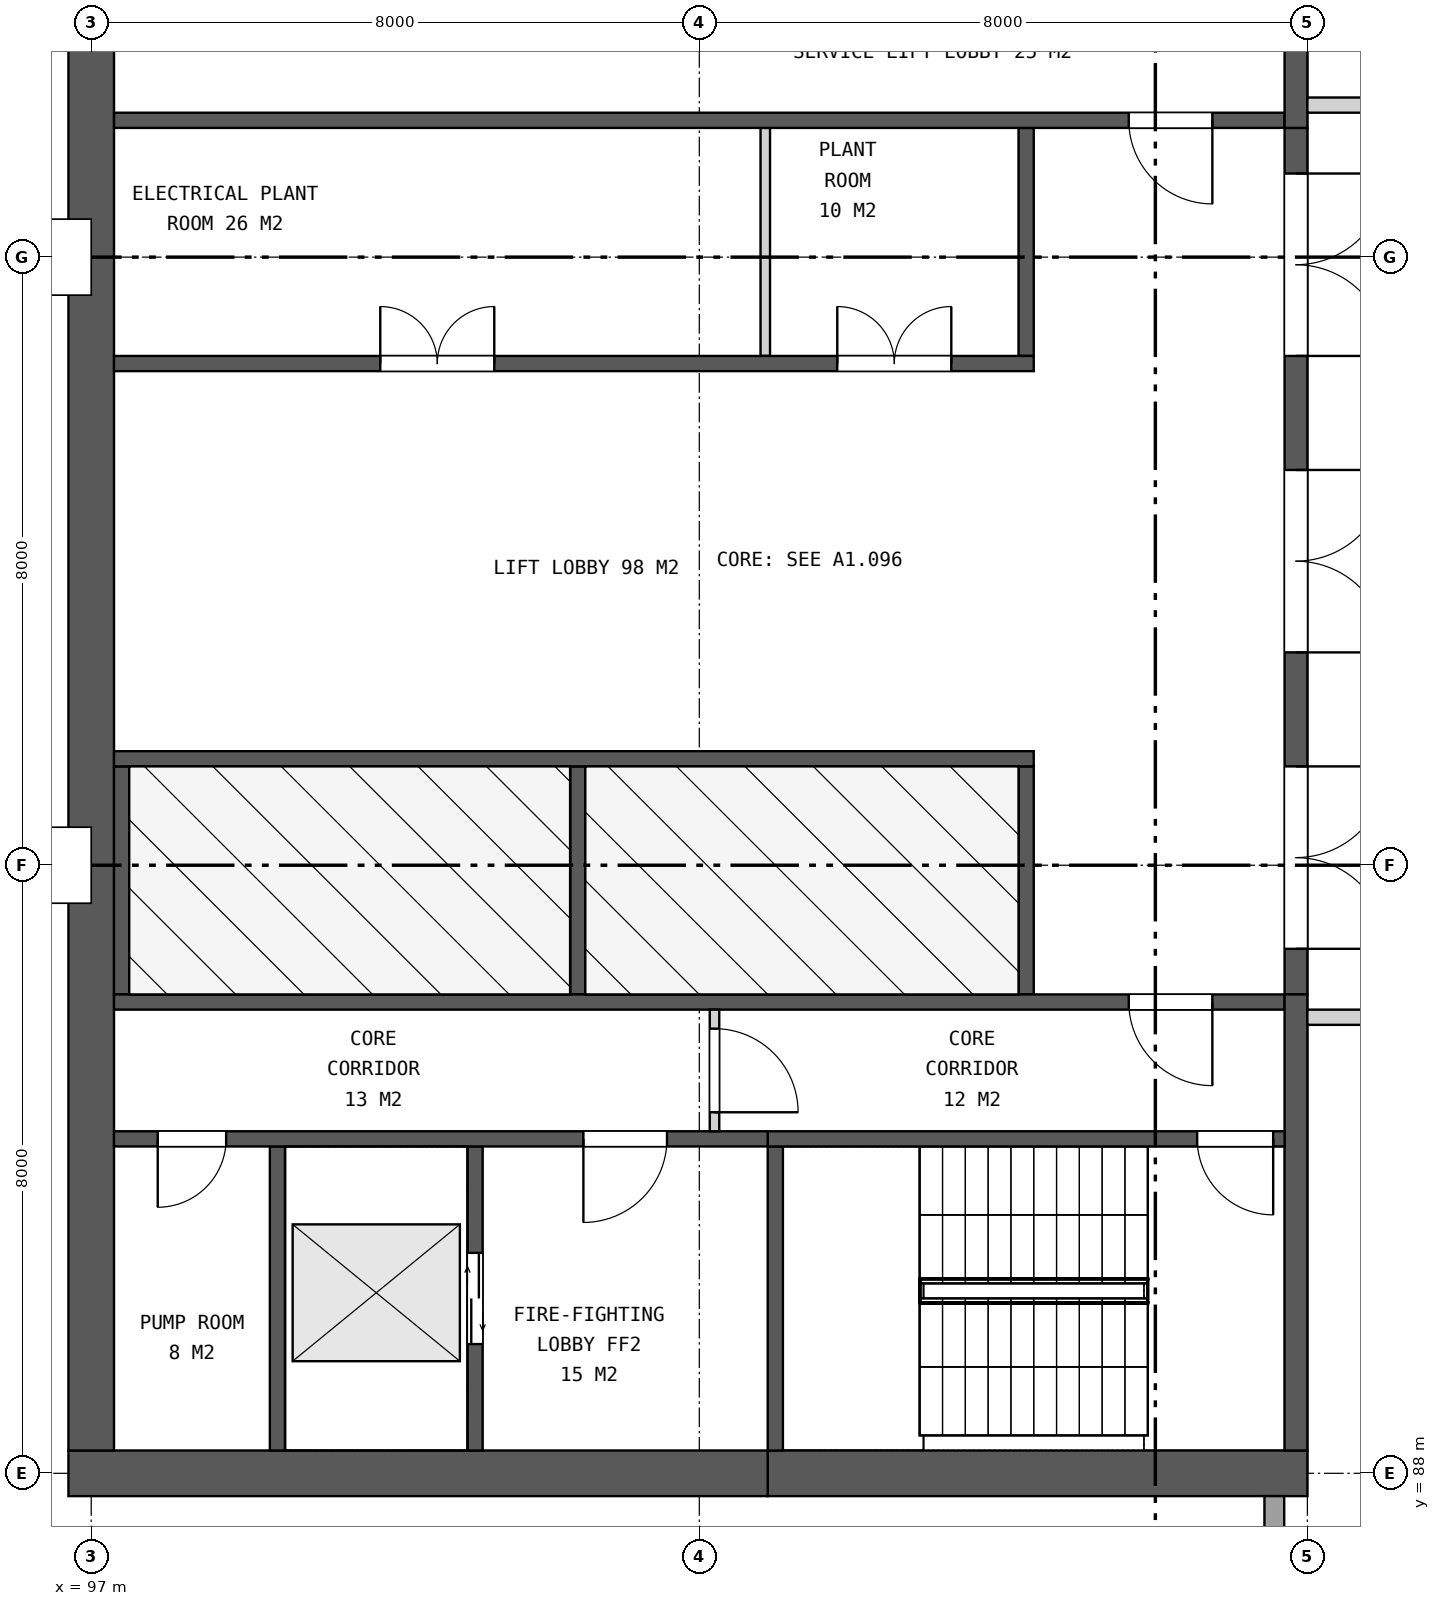
"""IFC4 building model, lengths in metres.
Left out: names, types, materials, properties, quantities, classifications, styles, units other than length and angle.
Written with IfcOpenShell. Run it as: python <this file> out.ifc"""

import sys

from ifc_helpers import new_model, si_unit, direction, frame, frame_2d, origin, place, context, subcontext, project, spatial, rectangle, extrude, element, fill, save


model = new_model("IFC4")
c1 = context("Model", 3, precision=1e-05, world=origin(), true_north=direction((0.0, 1.0)))
c2 = subcontext(c1, "Body", "Model", "MODEL_VIEW")
j1 = project(units=[si_unit("LENGTHUNIT", "METRE"), si_unit("PLANEANGLEUNIT", "RADIAN")], contexts=[c1])
p1 = place(None, origin())
s1 = spatial("IfcSite", under=j1, at=p1, CompositionType="ELEMENT")
p2 = place(p1, origin())
s2 = spatial("IfcBuilding", under=s1, at=p2, CompositionType="ELEMENT")
p3 = place(p2, frame((0.0, 0.0, 237.7)))
s3 = spatial("IfcBuildingStorey", under=s2, at=p3, CompositionType="ELEMENT", Elevation=237.7)
p4 = place(p3, frame((113.0, 88.0, 0.0), z_axis=(0.0, 0.0, 1.0), x_axis=(-1.0, 0.0, 0.0)))
e1 = element("IfcWall", 1, at=p4, inside=s3, PredefinedType="SHEAR", context=c2, shape_type="SweptSolid", body=[
    extrude(rectangle(XDim=7.1, YDim=0.6, at=frame_2d((3.55, 0.0))), origin(), (0.0, 0.0, 1.0), 7.4),
])
p5 = place(p3, frame((105.9, 88.0, 0.0), z_axis=(0.0, 0.0, 1.0), x_axis=(-1.0, 0.0, 0.0)))
e2 = element("IfcWall", 2, at=p5, inside=s3, PredefinedType="SHEAR", context=c2, shape_type="SweptSolid", body=[
    extrude(rectangle(XDim=9.2, YDim=0.6, at=frame_2d((4.6, 0.0))), origin(), (0.0, 0.0, 1.0), 7.4),
])
p6 = place(p3, frame((97.0, 111.7, 0.0), z_axis=(0.0, 0.0, 1.0), x_axis=(0.0, -1.0, 0.0)))
e3 = element("IfcWall", 3, at=p6, inside=s3, PredefinedType="SHEAR", context=c2, shape_type="SweptSolid", body=[
    extrude(rectangle(XDim=23.4, YDim=0.6, at=frame_2d((11.7, 0.0))), origin(), (0.0, 0.0, 1.0), 7.4),
])
p7 = place(p3, frame((112.85, 105.7, 0.0), z_axis=(0.0, 0.0, 1.0), x_axis=(0.0, -1.0, 0.0)))
e4 = element("IfcWall", 4, at=p7, inside=s3, PredefinedType="SHEAR", context=c2, shape_type="SweptSolid", body=[
    extrude(rectangle(XDim=11.4, YDim=0.3, at=frame_2d((5.7, 0.0))), origin(), (0.0, 0.0, 1.0), 7.4),
])
p8 = place(p7, frame((0.6, 0.0, 0.0)))
e5 = element("IfcOpeningElement", 5, at=p8, cuts=e4, PredefinedType="OPENING", context=c2, shape_type="SweptSolid", body=[
    extrude(rectangle(XDim=2.4, YDim=2.4, at=frame_2d((1.2, 1.2))), frame((0.0, 0.16, 0.0), z_axis=(0.0, -1.0, 0.0), x_axis=(1.0, 0.0, 0.0)), (0.0, 0.0, 1.0), 0.32),
])
p9 = place(p7, frame((4.5, 0.0, 0.0)))
e6 = element("IfcOpeningElement", 6, at=p9, cuts=e4, PredefinedType="OPENING", context=c2, shape_type="SweptSolid", body=[
    extrude(rectangle(XDim=2.4, YDim=2.4, at=frame_2d((1.2, 1.2))), frame((0.0, 0.16, 0.0), z_axis=(0.0, -1.0, 0.0), x_axis=(1.0, 0.0, 0.0)), (0.0, 0.0, 1.0), 0.32),
])
p10 = place(p7, frame((8.4, 0.0, 0.0)))
e7 = element("IfcOpeningElement", 7, at=p10, cuts=e4, PredefinedType="OPENING", context=c2, shape_type="SweptSolid", body=[
    extrude(rectangle(XDim=2.4, YDim=2.4, at=frame_2d((1.2, 1.2))), frame((0.0, 0.16, 0.0), z_axis=(0.0, -1.0, 0.0), x_axis=(1.0, 0.0, 0.0)), (0.0, 0.0, 1.0), 0.32),
])
for number, where, z_axis, x_axis in (
    (8, (109.3, 97.3, 0.0), (0.0, 0.0, 1.0), (0.0, -1.0, 0.0)),
    (9, (103.4, 97.3, 0.0), (0.0, 0.0, 1.0), (0.0, -1.0, 0.0)),
    (10, (97.4, 97.3, 0.0), (0.0, 0.0, 1.0), (0.0, -1.0, 0.0)),
):
    element("IfcWall", number, at=place(p3, frame(where, z_axis=z_axis, x_axis=x_axis)), inside=s3, PredefinedType="SHEAR", context=c2, shape_type="SweptSolid", body=[
        extrude(rectangle(XDim=3.0, YDim=0.2, at=frame_2d((1.5, 0.0))), origin(), (0.0, 0.0, 1.0), 7.4),
    ])
p11 = place(p3, frame((109.4, 97.4, 0.0), z_axis=(0.0, 0.0, 1.0), x_axis=(-1.0, 0.0, 0.0)))
e11 = element("IfcWall", 11, at=p11, inside=s3, PredefinedType="SHEAR", context=c2, shape_type="SweptSolid", body=[
    extrude(rectangle(XDim=12.1, YDim=0.2, at=frame_2d((6.05, 0.0))), origin(), (0.0, 0.0, 1.0), 7.4),
])
p12 = place(p3, frame((109.3, 105.7, 0.0), z_axis=(0.0, 0.0, 1.0), x_axis=(0.0, -1.0, 0.0)))
e12 = element("IfcWall", 12, at=p12, inside=s3, PredefinedType="SHEAR", context=c2, shape_type="SweptSolid", body=[
    extrude(rectangle(XDim=3.0, YDim=0.2, at=frame_2d((1.5, 0.0))), origin(), (0.0, 0.0, 1.0), 7.4),
])
p13 = place(p3, frame((105.868, 105.7, 0.0), z_axis=(0.0, 0.0, 1.0), x_axis=(0.0, -1.0, 0.0)))
e13 = element("IfcWall", 13, at=p13, inside=s3, PredefinedType="PARTITIONING", context=c2, shape_type="SweptSolid", body=[
    extrude(rectangle(XDim=3.0, YDim=0.125, at=frame_2d((1.5, 0.0))), origin(), (0.0, 0.0, 1.0), 7.4),
])
p14 = place(p3, frame((109.4, 102.6, 0.0), z_axis=(0.0, 0.0, 1.0), x_axis=(-1.0, 0.0, 0.0)))
e14 = element("IfcWall", 14, at=p14, inside=s3, PredefinedType="SHEAR", context=c2, shape_type="SweptSolid", body=[
    extrude(rectangle(XDim=12.1, YDim=0.2, at=frame_2d((6.05, 0.0))), origin(), (0.0, 0.0, 1.0), 7.4),
])
p15 = place(p14, frame((1.085, 0.0, 0.0)))
e15 = element("IfcOpeningElement", 15, at=p15, cuts=e14, PredefinedType="OPENING", context=c2, shape_type="SweptSolid", body=[
    extrude(rectangle(XDim=1.5, YDim=2.1, at=frame_2d((0.75, 1.05))), frame((0.0, 0.11, 0.0), z_axis=(0.0, -1.0, 0.0), x_axis=(1.0, 0.0, 0.0)), (0.0, 0.0, 1.0), 0.22),
])
p16 = place(p14, frame((7.097, 0.0, 0.0)))
e16 = element("IfcOpeningElement", 16, at=p16, cuts=e14, PredefinedType="OPENING", context=c2, shape_type="SweptSolid", body=[
    extrude(rectangle(XDim=1.5, YDim=2.1, at=frame_2d((0.75, 1.05))), frame((0.0, 0.11, 0.0), z_axis=(0.0, -1.0, 0.0), x_axis=(1.0, 0.0, 0.0)), (0.0, 0.0, 1.0), 0.22),
])
p17 = place(p3, frame((112.7, 94.2, 0.0), z_axis=(0.0, 0.0, 1.0), x_axis=(-1.0, 0.0, 0.0)))
e17 = element("IfcWall", 17, at=p17, inside=s3, PredefinedType="SHEAR", context=c2, shape_type="SweptSolid", body=[
    extrude(rectangle(XDim=15.4, YDim=0.2, at=frame_2d((7.7, 0.0))), origin(), (0.0, 0.0, 1.0), 7.4),
])
p18 = place(p17, frame((0.95, 0.0, 0.0)))
e18 = element("IfcOpeningElement", 18, at=p18, cuts=e17, PredefinedType="OPENING", context=c2, shape_type="SweptSolid", body=[
    extrude(rectangle(XDim=1.1, YDim=2.1, at=frame_2d((0.55, 1.05))), frame((0.0, 0.11, 0.0), z_axis=(0.0, -1.0, 0.0), x_axis=(1.0, 0.0, 0.0)), (0.0, 0.0, 1.0), 0.22),
])
p19 = place(p3, frame((112.85, 94.3, 0.0), z_axis=(0.0, 0.0, 1.0), x_axis=(0.0, -1.0, 0.0)))
e19 = element("IfcWall", 19, at=p19, inside=s3, PredefinedType="SHEAR", context=c2, shape_type="SweptSolid", body=[
    extrude(rectangle(XDim=6.0, YDim=0.3, at=frame_2d((3.0, 0.0))), origin(), (0.0, 0.0, 1.0), 7.4),
])
p20 = place(p3, frame((106.0, 92.3, 0.0), z_axis=(0.0, 0.0, 1.0), x_axis=(0.0, -1.0, 0.0)))
e20 = element("IfcWall", 20, at=p20, inside=s3, PredefinedType="SHEAR", context=c2, shape_type="SweptSolid", body=[
    extrude(rectangle(XDim=4.0, YDim=0.2, at=frame_2d((2.0, 0.0))), origin(), (0.0, 0.0, 1.0), 7.4),
])
p21 = place(p3, frame((102.05, 92.3, 0.0), z_axis=(0.0, 0.0, 1.0), x_axis=(0.0, -1.0, 0.0)))
e21 = element("IfcWall", 21, at=p21, inside=s3, PredefinedType="SHEAR", context=c2, shape_type="SweptSolid", body=[
    extrude(rectangle(XDim=4.0, YDim=0.2, at=frame_2d((2.0, 0.0))), origin(), (0.0, 0.0, 1.0), 7.4),
])
p22 = place(p21, frame((1.4, 0.0, 0.0)))
e22 = element("IfcOpeningElement", 22, at=p22, cuts=e21, PredefinedType="OPENING", context=c2, shape_type="SweptSolid", body=[
    extrude(rectangle(XDim=1.2, YDim=2.1, at=frame_2d((0.6, 1.05))), frame((0.0, 0.11, 0.0), z_axis=(0.0, -1.0, 0.0), x_axis=(1.0, 0.0, 0.0)), (0.0, 0.0, 1.0), 0.22),
])
p23 = place(p3, frame((99.45, 92.3, 0.0), z_axis=(0.0, 0.0, 1.0), x_axis=(0.0, -1.0, 0.0)))
e23 = element("IfcWall", 23, at=p23, inside=s3, PredefinedType="SHEAR", context=c2, shape_type="SweptSolid", body=[
    extrude(rectangle(XDim=4.0, YDim=0.2, at=frame_2d((2.0, 0.0))), origin(), (0.0, 0.0, 1.0), 7.4),
])
p24 = place(p3, frame((112.7, 92.4, 0.0), z_axis=(0.0, 0.0, 1.0), x_axis=(-1.0, 0.0, 0.0)))
e24 = element("IfcWall", 24, at=p24, inside=s3, PredefinedType="SHEAR", context=c2, shape_type="SweptSolid", body=[
    extrude(rectangle(XDim=6.8, YDim=0.2, at=frame_2d((3.4, 0.0))), origin(), (0.0, 0.0, 1.0), 7.4),
])
p25 = place(p24, frame((0.15, 0.0, 0.0)))
e25 = element("IfcOpeningElement", 25, at=p25, cuts=e24, PredefinedType="OPENING", context=c2, shape_type="SweptSolid", body=[
    extrude(rectangle(XDim=1.0, YDim=2.1, at=frame_2d((0.5, 1.05))), frame((0.0, 0.11, 0.0), z_axis=(0.0, -1.0, 0.0), x_axis=(1.0, 0.0, 0.0)), (0.0, 0.0, 1.0), 0.22),
])
p26 = place(p3, frame((105.9, 92.4, 0.0), z_axis=(0.0, 0.0, 1.0), x_axis=(-1.0, 0.0, 0.0)))
e26 = element("IfcWall", 26, at=p26, inside=s3, PredefinedType="SHEAR", context=c2, shape_type="SweptSolid", body=[
    extrude(rectangle(XDim=8.6, YDim=0.2, at=frame_2d((4.3, 0.0))), origin(), (0.0, 0.0, 1.0), 7.4),
])
p27 = place(p26, frame((1.325, 0.0, 0.0)))
e27 = element("IfcOpeningElement", 27, at=p27, cuts=e26, PredefinedType="OPENING", context=c2, shape_type="SweptSolid", body=[
    extrude(rectangle(XDim=1.1, YDim=2.1, at=frame_2d((0.55, 1.05))), frame((0.0, 0.11, 0.0), z_axis=(0.0, -1.0, 0.0), x_axis=(1.0, 0.0, 0.0)), (0.0, 0.0, 1.0), 0.22),
])
p28 = place(p26, frame((7.125, 0.0, 0.0)))
e28 = element("IfcOpeningElement", 28, at=p28, cuts=e26, PredefinedType="OPENING", context=c2, shape_type="SweptSolid", body=[
    extrude(rectangle(XDim=0.9, YDim=2.1, at=frame_2d((0.45, 1.05))), frame((0.0, 0.11, 0.0), z_axis=(0.0, -1.0, 0.0), x_axis=(1.0, 0.0, 0.0)), (0.0, 0.0, 1.0), 0.22),
])
p29 = place(p3, frame((105.2, 94.1, 0.0), z_axis=(0.0, 0.0, 1.0), x_axis=(0.0, -1.0, 0.0)))
e29 = element("IfcWall", 29, at=p29, inside=s3, PredefinedType="PARTITIONING", context=c2, shape_type="SweptSolid", body=[
    extrude(rectangle(XDim=1.6, YDim=0.125, at=frame_2d((0.8, 0.0))), origin(), (0.0, 0.0, 1.0), 7.4),
])
p30 = place(p29, frame((0.25, 0.0, 0.0)))
e30 = element("IfcOpeningElement", 30, at=p30, cuts=e29, PredefinedType="OPENING", context=c2, shape_type="SweptSolid", body=[
    extrude(rectangle(XDim=1.1, YDim=2.1, at=frame_2d((0.55, 1.05))), frame((0.0, 0.073, 0.0), z_axis=(0.0, -1.0, 0.0), x_axis=(1.0, 0.0, 0.0)), (0.0, 0.0, 1.0), 0.145),
])
p31 = place(p3, frame((112.7, 105.8, 0.0), z_axis=(0.0, 0.0, 1.0), x_axis=(-1.0, 0.0, 0.0)))
e31 = element("IfcWall", 31, at=p31, inside=s3, PredefinedType="SHEAR", context=c2, shape_type="SweptSolid", body=[
    extrude(rectangle(XDim=15.4, YDim=0.2, at=frame_2d((7.7, 0.0))), origin(), (0.0, 0.0, 1.0), 7.4),
])
p32 = place(p31, frame((0.95, 0.0, 0.0)))
e32 = element("IfcOpeningElement", 32, at=p32, cuts=e31, PredefinedType="OPENING", context=c2, shape_type="SweptSolid", body=[
    extrude(rectangle(XDim=1.1, YDim=2.1, at=frame_2d((0.55, 1.05))), frame((0.0, 0.11, 0.0), z_axis=(0.0, -1.0, 0.0), x_axis=(1.0, 0.0, 0.0)), (0.0, 0.0, 1.0), 0.22),
])
p33 = place(p3, frame((112.85, 111.7, 0.0), z_axis=(0.0, 0.0, 1.0), x_axis=(0.0, -1.0, 0.0)))
e33 = element("IfcWall", 33, at=p33, inside=s3, PredefinedType="SHEAR", context=c2, shape_type="SweptSolid", body=[
    extrude(rectangle(XDim=6.0, YDim=0.3, at=frame_2d((3.0, 0.0))), origin(), (0.0, 0.0, 1.0), 7.4),
])
p34 = place(p3, frame((112.565, 87.7, 0.0), z_axis=(0.0, 0.0, 1.0), x_axis=(0.0, -1.0, 0.0)))
e34 = element("IfcWall", 34, at=p34, inside=s3, PredefinedType="SOLIDWALL", context=c2, shape_type="SweptSolid", body=[
    extrude(rectangle(XDim=7.7, YDim=0.26, at=frame_2d((3.85, 0.0))), origin(), (0.0, 0.0, 1.0), 7.1),
])
p35 = place(p34, frame((0.5, 0.0, 1.2)))
e35 = element("IfcOpeningElement", 35, at=p35, cuts=e34, PredefinedType="OPENING", context=c2, shape_type="SweptSolid", body=[
    extrude(rectangle(XDim=2.0, YDim=3.0, at=frame_2d((1.0, 1.5))), frame((0.0, 0.14, 0.0), z_axis=(0.0, -1.0, 0.0), x_axis=(1.0, 0.0, 0.0)), (0.0, 0.0, 1.0), 0.28),
])
p36 = place(p34, frame((4.9, 0.0, 2.2)))
e36 = element("IfcOpeningElement", 36, at=p36, cuts=e34, PredefinedType="OPENING", context=c2, shape_type="SweptSolid", body=[
    extrude(rectangle(XDim=2.0, YDim=3.0, at=frame_2d((1.0, 1.5))), frame((0.0, 0.14, 0.0), z_axis=(0.0, -1.0, 0.0), x_axis=(1.0, 0.0, 0.0)), (0.0, 0.0, 1.0), 0.28),
])
p37 = place(p3, frame((113.0, 94.0, 0.0), z_axis=(0.0, 0.0, 1.0), x_axis=(1.0, 0.0, 0.0)))
e37 = element("IfcWall", 37, at=p37, inside=s3, PredefinedType="SOLIDWALL", context=c2, shape_type="SweptSolid", body=[
    extrude(rectangle(XDim=5.5, YDim=0.2, at=frame_2d((2.75, 0.0))), origin(), (0.0, 0.0, 1.0), 6.643),
])
p38 = place(p37, frame((2.25, 0.0, 0.0)))
e38 = element("IfcOpeningElement", 38, at=p38, cuts=e37, PredefinedType="OPENING", context=c2, shape_type="SweptSolid", body=[
    extrude(rectangle(XDim=1.0, YDim=2.1, at=frame_2d((0.5, 1.05))), frame((0.0, 0.11, 0.0), z_axis=(0.0, -1.0, 0.0), x_axis=(1.0, 0.0, 0.0)), (0.0, 0.0, 1.0), 0.22),
])
p39 = place(p3, frame((113.0, 106.0, 0.0), z_axis=(0.0, 0.0, 1.0), x_axis=(1.0, 0.0, 0.0)))
e39 = element("IfcWall", 39, at=p39, inside=s3, PredefinedType="SOLIDWALL", context=c2, shape_type="SweptSolid", body=[
    extrude(rectangle(XDim=5.5, YDim=0.2, at=frame_2d((2.75, 0.0))), origin(), (0.0, 0.0, 1.0), 6.643),
])
p40 = place(p39, frame((2.25, 0.0, 0.0)))
e40 = element("IfcOpeningElement", 40, at=p40, cuts=e39, PredefinedType="OPENING", context=c2, shape_type="SweptSolid", body=[
    extrude(rectangle(XDim=1.0, YDim=2.1, at=frame_2d((0.5, 1.05))), frame((0.0, 0.11, 0.0), z_axis=(0.0, -1.0, 0.0), x_axis=(1.0, 0.0, 0.0)), (0.0, 0.0, 1.0), 0.22),
])
p41 = place(p8, origin())
e41 = element("IfcDoor", 41, at=p41, inside=s3, OperationType="DOUBLE_DOOR_SINGLE_SWING", PredefinedType="DOOR", context=c2, shape_type="SweptSolid", body=[
    extrude(rectangle(XDim=2.4, YDim=2.4, at=frame_2d((1.2, 1.2))), frame((0.0, 0.025, 0.0), z_axis=(0.0, -1.0, 0.0), x_axis=(1.0, 0.0, 0.0)), (0.0, 0.0, 1.0), 0.05),
])
fill(e5, e41)
p42 = place(p9, origin())
e42 = element("IfcDoor", 42, at=p42, inside=s3, OperationType="DOUBLE_DOOR_SINGLE_SWING", PredefinedType="DOOR", context=c2, shape_type="SweptSolid", body=[
    extrude(rectangle(XDim=2.4, YDim=2.4, at=frame_2d((1.2, 1.2))), frame((0.0, 0.025, 0.0), z_axis=(0.0, -1.0, 0.0), x_axis=(1.0, 0.0, 0.0)), (0.0, 0.0, 1.0), 0.05),
])
fill(e6, e42)
p43 = place(p10, origin())
e43 = element("IfcDoor", 43, at=p43, inside=s3, OperationType="DOUBLE_DOOR_SINGLE_SWING", PredefinedType="DOOR", context=c2, shape_type="SweptSolid", body=[
    extrude(rectangle(XDim=2.4, YDim=2.4, at=frame_2d((1.2, 1.2))), frame((0.0, 0.025, 0.0), z_axis=(0.0, -1.0, 0.0), x_axis=(1.0, 0.0, 0.0)), (0.0, 0.0, 1.0), 0.05),
])
fill(e7, e43)
p44 = place(p15, frame((1.5, 0.0, 0.0), z_axis=(0.0, 0.0, 1.0), x_axis=(-1.0, 0.0, 0.0)))
e44 = element("IfcDoor", 44, at=p44, inside=s3, OperationType="DOUBLE_DOOR_SINGLE_SWING", PredefinedType="DOOR", context=c2, shape_type="SweptSolid", body=[
    extrude(rectangle(XDim=1.5, YDim=2.1, at=frame_2d((0.75, 1.05))), frame((0.0, 0.025, 0.0), z_axis=(0.0, -1.0, 0.0), x_axis=(1.0, 0.0, 0.0)), (0.0, 0.0, 1.0), 0.05),
])
fill(e15, e44)
p45 = place(p16, frame((1.5, 0.0, 0.0), z_axis=(0.0, 0.0, 1.0), x_axis=(-1.0, 0.0, 0.0)))
e45 = element("IfcDoor", 45, at=p45, inside=s3, OperationType="DOUBLE_DOOR_SINGLE_SWING", PredefinedType="DOOR", context=c2, shape_type="SweptSolid", body=[
    extrude(rectangle(XDim=1.5, YDim=2.1, at=frame_2d((0.75, 1.05))), frame((0.0, 0.025, 0.0), z_axis=(0.0, -1.0, 0.0), x_axis=(1.0, 0.0, 0.0)), (0.0, 0.0, 1.0), 0.05),
])
fill(e16, e45)
p46 = place(p18, origin())
e46 = element("IfcDoor", 46, at=p46, inside=s3, OperationType="SINGLE_SWING_LEFT", PredefinedType="DOOR", context=c2, shape_type="SweptSolid", body=[
    extrude(rectangle(XDim=1.1, YDim=2.1, at=frame_2d((0.55, 1.05))), frame((0.0, 0.025, 0.0), z_axis=(0.0, -1.0, 0.0), x_axis=(1.0, 0.0, 0.0)), (0.0, 0.0, 1.0), 0.05),
])
fill(e18, e46)
p47 = place(p22, origin())
e47 = element("IfcDoor", 47, at=p47, inside=s3, OperationType="DOUBLE_DOOR_SLIDING", PredefinedType="DOOR", context=c2, shape_type="SweptSolid", body=[
    extrude(rectangle(XDim=1.2, YDim=2.1, at=frame_2d((0.6, 1.05))), frame((0.0, 0.025, 0.0), z_axis=(0.0, -1.0, 0.0), x_axis=(1.0, 0.0, 0.0)), (0.0, 0.0, 1.0), 0.05),
])
fill(e22, e47)
p48 = place(p25, origin())
e48 = element("IfcDoor", 48, at=p48, inside=s3, OperationType="SINGLE_SWING_LEFT", PredefinedType="DOOR", context=c2, shape_type="SweptSolid", body=[
    extrude(rectangle(XDim=1.0, YDim=2.1, at=frame_2d((0.5, 1.05))), frame((0.0, 0.025, 0.0), z_axis=(0.0, -1.0, 0.0), x_axis=(1.0, 0.0, 0.0)), (0.0, 0.0, 1.0), 0.05),
])
fill(e25, e48)
p49 = place(p27, origin())
e49 = element("IfcDoor", 49, at=p49, inside=s3, OperationType="SINGLE_SWING_RIGHT", PredefinedType="DOOR", context=c2, shape_type="SweptSolid", body=[
    extrude(rectangle(XDim=1.1, YDim=2.1, at=frame_2d((0.55, 1.05))), frame((0.0, 0.025, 0.0), z_axis=(0.0, -1.0, 0.0), x_axis=(1.0, 0.0, 0.0)), (0.0, 0.0, 1.0), 0.05),
])
fill(e27, e49)
p50 = place(p28, origin())
e50 = element("IfcDoor", 50, at=p50, inside=s3, OperationType="SINGLE_SWING_RIGHT", PredefinedType="DOOR", context=c2, shape_type="SweptSolid", body=[
    extrude(rectangle(XDim=0.9, YDim=2.1, at=frame_2d((0.45, 1.05))), frame((0.0, 0.025, 0.0), z_axis=(0.0, -1.0, 0.0), x_axis=(1.0, 0.0, 0.0)), (0.0, 0.0, 1.0), 0.05),
])
fill(e28, e50)
p51 = place(p30, origin())
e51 = element("IfcDoor", 51, at=p51, inside=s3, OperationType="SINGLE_SWING_RIGHT", PredefinedType="DOOR", context=c2, shape_type="SweptSolid", body=[
    extrude(rectangle(XDim=1.1, YDim=2.1, at=frame_2d((0.55, 1.05))), frame((0.0, 0.025, 0.0), z_axis=(0.0, -1.0, 0.0), x_axis=(1.0, 0.0, 0.0)), (0.0, 0.0, 1.0), 0.05),
])
fill(e30, e51)
p52 = place(p32, origin())
e52 = element("IfcDoor", 52, at=p52, inside=s3, OperationType="SINGLE_SWING_LEFT", PredefinedType="DOOR", context=c2, shape_type="SweptSolid", body=[
    extrude(rectangle(XDim=1.1, YDim=2.1, at=frame_2d((0.55, 1.05))), frame((0.0, 0.025, 0.0), z_axis=(0.0, -1.0, 0.0), x_axis=(1.0, 0.0, 0.0)), (0.0, 0.0, 1.0), 0.05),
])
fill(e32, e52)
save(model, sys.argv[1])
